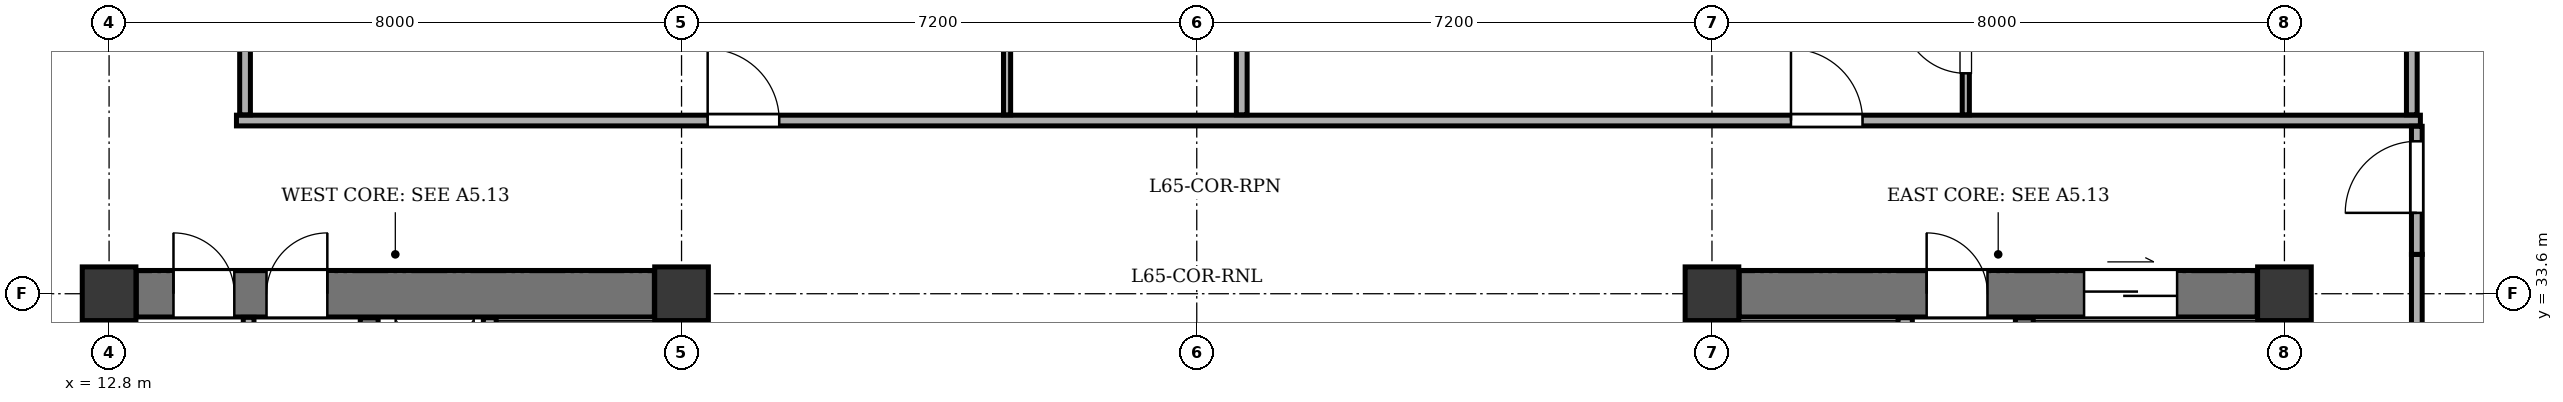
"""IFC4 building model, lengths in metres.
Left out: names, types, materials, properties, quantities, classifications, styles, units other than length and angle.
Written with IfcOpenShell. Run it as: python <this file> out.ifc"""

import sys

from ifc_helpers import new_model, si_unit, direction, frame, frame_2d, origin, origin_2d, place, context, subcontext, project, spatial, rectangle, extrude, element, fill, save


model = new_model("IFC4")
c1 = context("Model", 3, precision=1e-05, world=origin(), true_north=direction((0.0, 1.0)))
c2 = subcontext(c1, "Body", "Model", "MODEL_VIEW")
j1 = project(units=[si_unit("LENGTHUNIT", "METRE"), si_unit("PLANEANGLEUNIT", "RADIAN")], contexts=[c1])
p1 = place(None, origin())
s1 = spatial("IfcSite", under=j1, at=p1, CompositionType="ELEMENT")
p2 = place(p1, origin())
s2 = spatial("IfcBuilding", under=s1, at=p2, CompositionType="ELEMENT")
p3 = place(p2, frame((0.0, 0.0, 248.3)))
s3 = spatial("IfcBuildingStorey", under=s2, at=p3, CompositionType="ELEMENT", Elevation=248.3)
for number, where, z_axis, x_axis in (
    (1, (12.8, 33.6, 0.0), (0.0, 0.0, 1.0), (1.0, 0.0, 0.0)),
    (2, (20.8, 33.6, 0.0), (0.0, 0.0, 1.0), (1.0, 0.0, 0.0)),
    (3, (35.2, 33.6, 0.0), (0.0, 0.0, 1.0), (1.0, 0.0, 0.0)),
    (4, (43.2, 33.6, 0.0), (0.0, 0.0, 1.0), (1.0, 0.0, 0.0)),
):
    element("IfcColumn", number, at=place(p3, frame(where, z_axis=z_axis, x_axis=x_axis)), inside=s3, PredefinedType="COLUMN", context=c2, shape_type="SweptSolid", body=[
        extrude(rectangle(XDim=0.75, YDim=0.75, at=origin_2d()), origin(), (0.0, 0.0, 1.0), 3.4),
    ])
p4 = place(p3, frame((12.8, 21.18, 0.0), z_axis=(0.0, 0.0, 1.0), x_axis=(0.0, 1.0, 0.0)))
e5 = element("IfcWall", 5, at=p4, inside=s3, PredefinedType="SHEAR", context=c2, shape_type="SweptSolid", body=[
    extrude(rectangle(XDim=12.04, YDim=0.65, at=frame_2d((6.02, 0.0))), origin(), (0.0, 0.0, 1.0), 3.1),
])
p5 = place(p3, frame((13.18, 33.6, 0.0), z_axis=(0.0, 0.0, 1.0), x_axis=(1.0, 0.0, 0.0)))
e6 = element("IfcWall", 6, at=p5, inside=s3, PredefinedType="SHEAR", context=c2, shape_type="SweptSolid", body=[
    extrude(rectangle(XDim=7.24, YDim=0.65, at=frame_2d((3.62, 0.0))), origin(), (0.0, 0.0, 1.0), 3.1),
])
p6 = place(p5, frame((0.52, 0.0, 0.0)))
e7 = element("IfcOpeningElement", 7, at=p6, cuts=e6, PredefinedType="OPENING", context=c2, shape_type="SweptSolid", body=[
    extrude(rectangle(XDim=0.85, YDim=2.02, at=frame_2d((0.425, 1.01))), frame((0.0, 0.335, 0.0), z_axis=(0.0, -1.0, 0.0), x_axis=(1.0, 0.0, 0.0)), (0.0, 0.0, 1.0), 0.67),
])
p7 = place(p5, frame((1.82, 0.0, 0.0)))
e8 = element("IfcOpeningElement", 8, at=p7, cuts=e6, PredefinedType="OPENING", context=c2, shape_type="SweptSolid", body=[
    extrude(rectangle(XDim=0.85, YDim=2.02, at=frame_2d((0.425, 1.01))), frame((0.0, 0.335, 0.0), z_axis=(0.0, -1.0, 0.0), x_axis=(1.0, 0.0, 0.0)), (0.0, 0.0, 1.0), 0.67),
])
p8 = place(p3, frame((20.8, 31.1, 0.0), z_axis=(0.0, 0.0, 1.0), x_axis=(0.0, 1.0, 0.0)))
e9 = element("IfcWall", 9, at=p8, inside=s3, PredefinedType="SHEAR", context=c2, shape_type="SweptSolid", body=[
    extrude(rectangle(XDim=2.12, YDim=0.65, at=frame_2d((1.06, 0.0))), origin(), (0.0, 0.0, 1.0), 3.1),
])
p9 = place(p8, frame((0.4, 0.0, 0.0)))
e10 = element("IfcOpeningElement", 10, at=p9, cuts=e9, PredefinedType="OPENING", context=c2, shape_type="SweptSolid", body=[
    extrude(rectangle(XDim=1.1, YDim=2.1, at=frame_2d((0.55, 1.05))), frame((0.0, 0.335, 0.0), z_axis=(0.0, -1.0, 0.0), x_axis=(1.0, 0.0, 0.0)), (0.0, 0.0, 1.0), 0.67),
])
p10 = place(p3, frame((16.435, 21.135, 0.0), z_axis=(0.0, 0.0, 1.0), x_axis=(0.0, 1.0, 0.0)))
e11 = element("IfcWall", 11, at=p10, inside=s3, PredefinedType="SHEAR", context=c2, shape_type="SweptSolid", body=[
    extrude(rectangle(XDim=12.13, YDim=0.25, at=frame_2d((6.065, 0.0))), origin(), (0.0, 0.0, 1.0), 3.1),
])
p11 = place(p10, frame((0.515, 0.0, 0.0)))
e12 = element("IfcOpeningElement", 12, at=p11, cuts=e11, PredefinedType="OPENING", context=c2, shape_type="SweptSolid", body=[
    extrude(rectangle(XDim=1.2, YDim=2.15, at=frame_2d((0.6, 1.075))), frame((0.0, 0.135, 0.0), z_axis=(0.0, -1.0, 0.0), x_axis=(1.0, 0.0, 0.0)), (0.0, 0.0, 1.0), 0.27),
])
p12 = place(p10, frame((2.665, 0.0, 0.0)))
e13 = element("IfcOpeningElement", 13, at=p12, cuts=e11, PredefinedType="OPENING", context=c2, shape_type="SweptSolid", body=[
    extrude(rectangle(XDim=1.15, YDim=2.15, at=frame_2d((0.575, 1.075))), frame((0.0, 0.135, 0.0), z_axis=(0.0, -1.0, 0.0), x_axis=(1.0, 0.0, 0.0)), (0.0, 0.0, 1.0), 0.27),
])
p13 = place(p3, frame((18.12, 31.17, 0.0), z_axis=(0.0, 0.0, 1.0), x_axis=(0.0, 1.0, 0.0)))
e14 = element("IfcWall", 14, at=p13, inside=s3, PredefinedType="PARTITIONING", context=c2, shape_type="SweptSolid", body=[
    extrude(rectangle(XDim=2.095, YDim=0.18, at=frame_2d((1.047, 0.0))), origin(), (0.0, 0.0, 1.0), 3.1),
])
p14 = place(p3, frame((43.2, 21.18, 0.0), z_axis=(0.0, 0.0, 1.0), x_axis=(0.0, 1.0, 0.0)))
e15 = element("IfcWall", 15, at=p14, inside=s3, PredefinedType="SHEAR", context=c2, shape_type="SweptSolid", body=[
    extrude(rectangle(XDim=12.04, YDim=0.65, at=frame_2d((6.02, 0.0))), origin(), (0.0, 0.0, 1.0), 3.1),
])
p15 = place(p3, frame((35.58, 33.6, 0.0), z_axis=(0.0, 0.0, 1.0), x_axis=(1.0, 0.0, 0.0)))
e16 = element("IfcWall", 16, at=p15, inside=s3, PredefinedType="SHEAR", context=c2, shape_type="SweptSolid", body=[
    extrude(rectangle(XDim=7.24, YDim=0.65, at=frame_2d((3.62, 0.0))), origin(), (0.0, 0.0, 1.0), 3.1),
])
p16 = place(p15, frame((4.82, 0.0, 0.0)))
e17 = element("IfcOpeningElement", 17, at=p16, cuts=e16, PredefinedType="OPENING", context=c2, shape_type="SweptSolid", body=[
    extrude(rectangle(XDim=1.3, YDim=2.15, at=frame_2d((0.65, 1.075))), frame((0.0, 0.335, 0.0), z_axis=(0.0, -1.0, 0.0), x_axis=(1.0, 0.0, 0.0)), (0.0, 0.0, 1.0), 0.67),
])
p17 = place(p15, frame((2.62, 0.0, 0.0)))
e18 = element("IfcOpeningElement", 18, at=p17, cuts=e16, PredefinedType="OPENING", context=c2, shape_type="SweptSolid", body=[
    extrude(rectangle(XDim=0.85, YDim=2.02, at=frame_2d((0.425, 1.01))), frame((0.0, 0.335, 0.0), z_axis=(0.0, -1.0, 0.0), x_axis=(1.0, 0.0, 0.0)), (0.0, 0.0, 1.0), 0.67),
])
p18 = place(p3, frame((35.2, 31.1, 0.0), z_axis=(0.0, 0.0, 1.0), x_axis=(0.0, 1.0, 0.0)))
e19 = element("IfcWall", 19, at=p18, inside=s3, PredefinedType="SHEAR", context=c2, shape_type="SweptSolid", body=[
    extrude(rectangle(XDim=2.12, YDim=0.65, at=frame_2d((1.06, 0.0))), origin(), (0.0, 0.0, 1.0), 3.1),
])
p19 = place(p18, frame((0.4, 0.0, 0.0)))
e20 = element("IfcOpeningElement", 20, at=p19, cuts=e19, PredefinedType="OPENING", context=c2, shape_type="SweptSolid", body=[
    extrude(rectangle(XDim=1.1, YDim=2.1, at=frame_2d((0.55, 1.05))), frame((0.0, 0.335, 0.0), z_axis=(0.0, -1.0, 0.0), x_axis=(1.0, 0.0, 0.0)), (0.0, 0.0, 1.0), 0.67),
])
p20 = place(p3, frame((39.565, 21.135, 0.0), z_axis=(0.0, 0.0, 1.0), x_axis=(0.0, 1.0, 0.0)))
e21 = element("IfcWall", 21, at=p20, inside=s3, PredefinedType="SHEAR", context=c2, shape_type="SweptSolid", body=[
    extrude(rectangle(XDim=12.13, YDim=0.25, at=frame_2d((6.065, 0.0))), origin(), (0.0, 0.0, 1.0), 3.1),
])
p21 = place(p20, frame((0.515, 0.0, 0.0)))
e22 = element("IfcOpeningElement", 22, at=p21, cuts=e21, PredefinedType="OPENING", context=c2, shape_type="SweptSolid", body=[
    extrude(rectangle(XDim=1.2, YDim=2.15, at=frame_2d((0.6, 1.075))), frame((0.0, 0.135, 0.0), z_axis=(0.0, -1.0, 0.0), x_axis=(1.0, 0.0, 0.0)), (0.0, 0.0, 1.0), 0.27),
])
p22 = place(p20, frame((2.665, 0.0, 0.0)))
e23 = element("IfcOpeningElement", 23, at=p22, cuts=e21, PredefinedType="OPENING", context=c2, shape_type="SweptSolid", body=[
    extrude(rectangle(XDim=1.15, YDim=2.15, at=frame_2d((0.575, 1.075))), frame((0.0, 0.135, 0.0), z_axis=(0.0, -1.0, 0.0), x_axis=(1.0, 0.0, 0.0)), (0.0, 0.0, 1.0), 0.27),
])
p23 = place(p3, frame((37.9, 25.27, 0.0), z_axis=(0.0, 0.0, 1.0), x_axis=(0.0, 1.0, 0.0)))
e24 = element("IfcWall", 24, at=p23, inside=s3, PredefinedType="SOLIDWALL", context=c2, shape_type="SweptSolid", body=[
    extrude(rectangle(XDim=7.995, YDim=0.2, at=frame_2d((3.998, 0.0))), origin(), (0.0, 0.0, 1.0), 3.1),
])
p24 = place(p3, frame((14.75, 30.96, 0.0), z_axis=(0.0, 0.0, 1.0), x_axis=(0.0, 1.0, 0.0)))
e25 = element("IfcWall", 25, at=p24, inside=s3, PredefinedType="PARTITIONING", context=c2, shape_type="SweptSolid", body=[
    extrude(rectangle(XDim=2.31, YDim=0.15, at=frame_2d((1.155, 0.0))), origin(), (0.0, 0.0, 1.0), 3.1),
])
p25 = place(p24, frame((0.47, 0.0, 0.0)))
e26 = element("IfcOpeningElement", 26, at=p25, cuts=e25, PredefinedType="OPENING", context=c2, shape_type="SweptSolid", body=[
    extrude(rectangle(XDim=0.85, YDim=2.02, at=frame_2d((0.425, 1.01))), frame((0.0, 0.085, 0.0), z_axis=(0.0, -1.0, 0.0), x_axis=(1.0, 0.0, 0.0)), (0.0, 0.0, 1.0), 0.17),
])
p26 = place(p3, frame((14.58, 36.02, 0.0), z_axis=(0.0, 0.0, 1.0), x_axis=(1.0, 0.0, 0.0)))
e27 = element("IfcWall", 27, at=p26, inside=s3, PredefinedType="PARTITIONING", context=c2, shape_type="SweptSolid", body=[
    extrude(rectangle(XDim=30.52, YDim=0.15, at=frame_2d((15.26, 0.0))), origin(), (0.0, 0.0, 1.0), 3.1),
])
p27 = place(p26, frame((6.585, 0.0, 0.0)))
e28 = element("IfcOpeningElement", 28, at=p27, cuts=e27, PredefinedType="OPENING", context=c2, shape_type="SweptSolid", body=[
    extrude(rectangle(XDim=1.0, YDim=2.1, at=frame_2d((0.5, 1.05))), frame((0.0, 0.085, 0.0), z_axis=(0.0, -1.0, 0.0), x_axis=(1.0, 0.0, 0.0)), (0.0, 0.0, 1.0), 0.17),
])
p28 = place(p26, frame((21.724, 0.0, 0.0)))
e29 = element("IfcOpeningElement", 29, at=p28, cuts=e27, PredefinedType="OPENING", context=c2, shape_type="SweptSolid", body=[
    extrude(rectangle(XDim=1.0, YDim=2.1, at=frame_2d((0.5, 1.05))), frame((0.0, 0.085, 0.0), z_axis=(0.0, -1.0, 0.0), x_axis=(1.0, 0.0, 0.0)), (0.0, 0.0, 1.0), 0.17),
])
p29 = place(p3, frame((14.7, 36.1, 0.0), z_axis=(0.0, 0.0, 1.0), x_axis=(0.0, 1.0, 0.0)))
e30 = element("IfcWall", 30, at=p29, inside=s3, PredefinedType="PARTITIONING", context=c2, shape_type="SweptSolid", body=[
    extrude(rectangle(XDim=8.655, YDim=0.15, at=frame_2d((4.327, 0.0))), origin(), (0.0, 0.0, 1.0), 3.1),
])
p30 = place(p3, frame((25.349, 36.1, 0.0), z_axis=(0.0, 0.0, 1.0), x_axis=(0.0, 1.0, 0.0)))
e31 = element("IfcWall", 31, at=p30, inside=s3, PredefinedType="PARTITIONING", context=c2, shape_type="SweptSolid", body=[
    extrude(rectangle(XDim=6.095, YDim=0.1, at=frame_2d((3.047, 0.0))), origin(), (0.0, 0.0, 1.0), 3.1),
])
p31 = place(p30, frame((2.585, 0.0, 0.0)))
e32 = element("IfcOpeningElement", 32, at=p31, cuts=e31, PredefinedType="OPENING", context=c2, shape_type="SweptSolid", body=[
    extrude(rectangle(XDim=0.9, YDim=2.05, at=frame_2d((0.45, 1.025))), frame((0.0, 0.06, 0.0), z_axis=(0.0, -1.0, 0.0), x_axis=(1.0, 0.0, 0.0)), (0.0, 0.0, 1.0), 0.12),
])
p32 = place(p3, frame((28.629, 36.1, 0.0), z_axis=(0.0, 0.0, 1.0), x_axis=(0.0, 1.0, 0.0)))
e33 = element("IfcWall", 33, at=p32, inside=s3, PredefinedType="PARTITIONING", context=c2, shape_type="SweptSolid", body=[
    extrude(rectangle(XDim=8.655, YDim=0.15, at=frame_2d((4.327, 0.0))), origin(), (0.0, 0.0, 1.0), 3.1),
])
p33 = place(p3, frame((38.747, 36.1, 0.0), z_axis=(0.0, 0.0, 1.0), x_axis=(0.0, 1.0, 0.0)))
e34 = element("IfcWall", 34, at=p33, inside=s3, PredefinedType="PARTITIONING", context=c2, shape_type="SweptSolid", body=[
    extrude(rectangle(XDim=6.095, YDim=0.1, at=frame_2d((3.047, 0.0))), origin(), (0.0, 0.0, 1.0), 3.1),
])
p34 = place(p33, frame((0.58, 0.0, 0.0)))
e35 = element("IfcOpeningElement", 35, at=p34, cuts=e34, PredefinedType="OPENING", context=c2, shape_type="SweptSolid", body=[
    extrude(rectangle(XDim=0.9, YDim=2.05, at=frame_2d((0.45, 1.025))), frame((0.0, 0.06, 0.0), z_axis=(0.0, -1.0, 0.0), x_axis=(1.0, 0.0, 0.0)), (0.0, 0.0, 1.0), 0.12),
])
p35 = place(p3, frame((44.98, 36.1, 0.0), z_axis=(0.0, 0.0, 1.0), x_axis=(0.0, 1.0, 0.0)))
e36 = element("IfcWall", 36, at=p35, inside=s3, PredefinedType="PARTITIONING", context=c2, shape_type="SweptSolid", body=[
    extrude(rectangle(XDim=8.655, YDim=0.15, at=frame_2d((4.327, 0.0))), origin(), (0.0, 0.0, 1.0), 2.725),
])
p36 = place(p3, frame((45.05, 20.25, 0.0), z_axis=(0.0, 0.0, 1.0), x_axis=(0.0, 1.0, 0.0)))
e37 = element("IfcWall", 37, at=p36, inside=s3, PredefinedType="PARTITIONING", context=c2, shape_type="SweptSolid", body=[
    extrude(rectangle(XDim=13.9, YDim=0.15, at=frame_2d((6.95, 0.0))), origin(), (0.0, 0.0, 1.0), 2.725),
])
p37 = place(p3, frame((45.05, 34.15, 0.0), z_axis=(0.0, 0.0, 1.0), x_axis=(0.0, 1.0, 0.0)))
e38 = element("IfcWall", 38, at=p37, inside=s3, PredefinedType="PARTITIONING", context=c2, shape_type="SweptSolid", body=[
    extrude(rectangle(XDim=1.79, YDim=0.15, at=frame_2d((0.895, 0.0))), origin(), (0.0, 0.0, 1.0), 2.725),
])
p38 = place(p37, frame((0.58, 0.0, 0.0)))
e39 = element("IfcOpeningElement", 39, at=p38, cuts=e38, PredefinedType="OPENING", context=c2, shape_type="SweptSolid", body=[
    extrude(rectangle(XDim=1.0, YDim=2.1, at=frame_2d((0.5, 1.05))), frame((0.0, 0.085, 0.0), z_axis=(0.0, -1.0, 0.0), x_axis=(1.0, 0.0, 0.0)), (0.0, 0.0, 1.0), 0.17),
])
p39 = place(p6, origin())
e40 = element("IfcDoor", 40, at=p39, inside=s3, OperationType="SINGLE_SWING_LEFT", PredefinedType="DOOR", context=c2, shape_type="SweptSolid", body=[
    extrude(rectangle(XDim=0.85, YDim=2.02, at=frame_2d((0.425, 1.01))), frame((0.0, 0.025, 0.0), z_axis=(0.0, -1.0, 0.0), x_axis=(1.0, 0.0, 0.0)), (0.0, 0.0, 1.0), 0.05),
])
fill(e7, e40)
p40 = place(p7, origin())
e41 = element("IfcDoor", 41, at=p40, inside=s3, OperationType="SINGLE_SWING_RIGHT", PredefinedType="DOOR", context=c2, shape_type="SweptSolid", body=[
    extrude(rectangle(XDim=0.85, YDim=2.02, at=frame_2d((0.425, 1.01))), frame((0.0, 0.025, 0.0), z_axis=(0.0, -1.0, 0.0), x_axis=(1.0, 0.0, 0.0)), (0.0, 0.0, 1.0), 0.05),
])
fill(e8, e41)
p41 = place(p16, origin())
e42 = element("IfcDoor", 42, at=p41, inside=s3, OperationType="DOUBLE_DOOR_SLIDING", PredefinedType="DOOR", context=c2, shape_type="SweptSolid", body=[
    extrude(rectangle(XDim=1.3, YDim=2.15, at=frame_2d((0.65, 1.075))), frame((0.0, 0.025, 0.0), z_axis=(0.0, -1.0, 0.0), x_axis=(1.0, 0.0, 0.0)), (0.0, 0.0, 1.0), 0.05),
])
fill(e17, e42)
p42 = place(p17, origin())
e43 = element("IfcDoor", 43, at=p42, inside=s3, OperationType="SINGLE_SWING_LEFT", PredefinedType="DOOR", context=c2, shape_type="SweptSolid", body=[
    extrude(rectangle(XDim=0.85, YDim=2.02, at=frame_2d((0.425, 1.01))), frame((0.0, 0.025, 0.0), z_axis=(0.0, -1.0, 0.0), x_axis=(1.0, 0.0, 0.0)), (0.0, 0.0, 1.0), 0.05),
])
fill(e18, e43)
p43 = place(p27, origin())
e44 = element("IfcDoor", 44, at=p43, inside=s3, OperationType="SINGLE_SWING_LEFT", PredefinedType="DOOR", context=c2, shape_type="SweptSolid", body=[
    extrude(rectangle(XDim=1.0, YDim=2.1, at=frame_2d((0.5, 1.05))), frame((0.0, 0.025, 0.0), z_axis=(0.0, -1.0, 0.0), x_axis=(1.0, 0.0, 0.0)), (0.0, 0.0, 1.0), 0.05),
])
fill(e28, e44)
p44 = place(p28, origin())
e45 = element("IfcDoor", 45, at=p44, inside=s3, OperationType="SINGLE_SWING_LEFT", PredefinedType="DOOR", context=c2, shape_type="SweptSolid", body=[
    extrude(rectangle(XDim=1.0, YDim=2.1, at=frame_2d((0.5, 1.05))), frame((0.0, 0.025, 0.0), z_axis=(0.0, -1.0, 0.0), x_axis=(1.0, 0.0, 0.0)), (0.0, 0.0, 1.0), 0.05),
])
fill(e29, e45)
p45 = place(p34, origin())
e46 = element("IfcDoor", 46, at=p45, inside=s3, OperationType="SINGLE_SWING_RIGHT", PredefinedType="DOOR", context=c2, shape_type="SweptSolid", body=[
    extrude(rectangle(XDim=0.9, YDim=2.05, at=frame_2d((0.45, 1.025))), frame((0.0, 0.025, 0.0), z_axis=(0.0, -1.0, 0.0), x_axis=(1.0, 0.0, 0.0)), (0.0, 0.0, 1.0), 0.05),
])
fill(e35, e46)
p46 = place(p38, origin())
e47 = element("IfcDoor", 47, at=p46, inside=s3, OperationType="SINGLE_SWING_LEFT", PredefinedType="DOOR", context=c2, shape_type="SweptSolid", body=[
    extrude(rectangle(XDim=1.0, YDim=2.1, at=frame_2d((0.5, 1.05))), frame((0.0, 0.025, 0.0), z_axis=(0.0, -1.0, 0.0), x_axis=(1.0, 0.0, 0.0)), (0.0, 0.0, 1.0), 0.05),
])
fill(e39, e47)
save(model, sys.argv[1])
